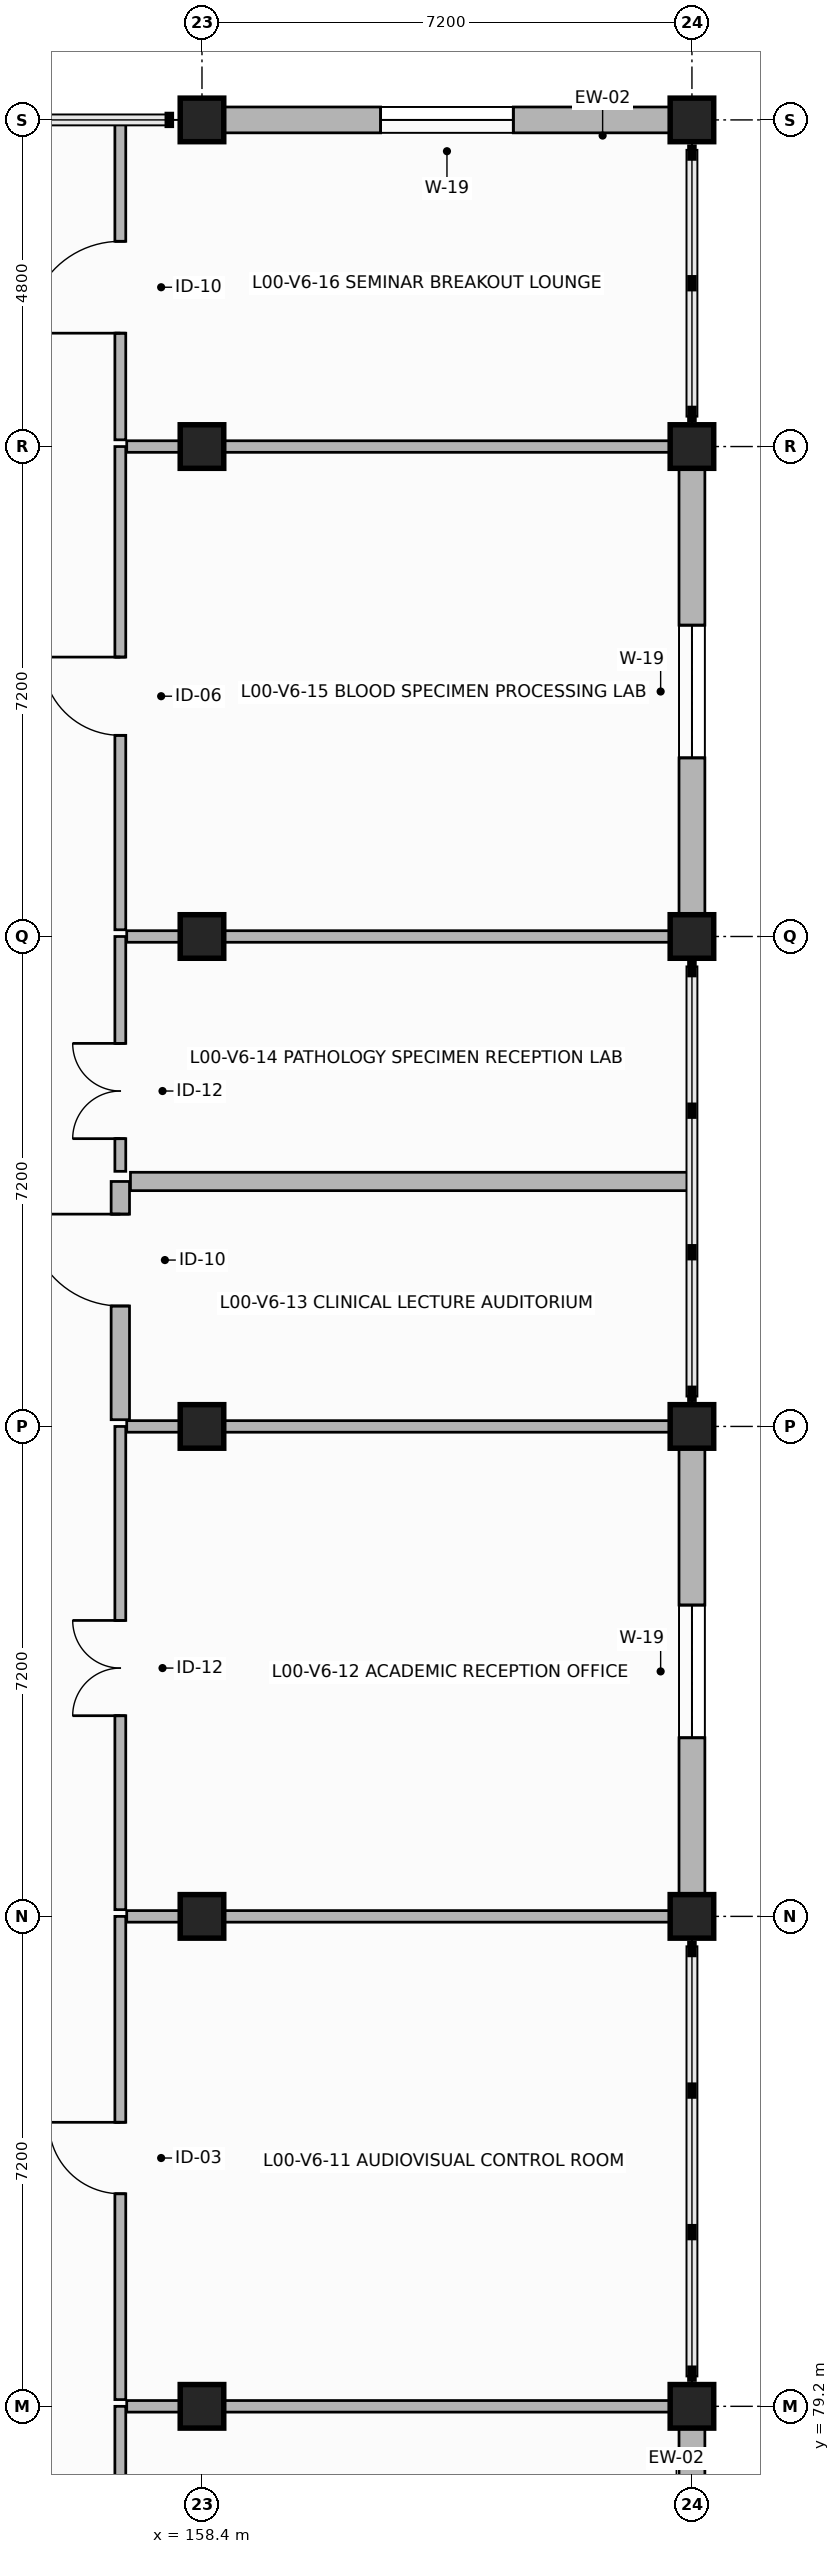
"""IFC4 building model, lengths in metres.
Left out: names, types, materials, properties, quantities, classifications, styles, units other than length and angle.
Written with IfcOpenShell. Run it as: python <this file> out.ifc"""

import sys

from ifc_helpers import new_model, si_unit, direction, frame, frame_2d, origin, origin_2d, place, context, subcontext, project, spatial, rectangle, extrude, element, fill, save


model = new_model("IFC4")
c1 = context("Model", 3, precision=1e-05, world=origin(), true_north=direction((0.0, 1.0)))
c2 = subcontext(c1, "Body", "Model", "MODEL_VIEW")
j1 = project(units=[si_unit("LENGTHUNIT", "METRE"), si_unit("PLANEANGLEUNIT", "RADIAN")], contexts=[c1])
p1 = place(None, origin())
s1 = spatial("IfcSite", under=j1, at=p1, CompositionType="ELEMENT")
p2 = place(p1, origin())
s2 = spatial("IfcBuilding", under=s1, at=p2, CompositionType="ELEMENT")
p3 = place(p2, origin())
s3 = spatial("IfcBuildingStorey", under=s2, at=p3, CompositionType="ELEMENT", Elevation=0.0)
for number, where, z_axis, x_axis in (
    (1, (158.4, 79.2, -0.38), (0.0, 0.0, 1.0), (1.0, 0.0, 0.0)),
    (2, (158.4, 86.4, -0.38), (0.0, 0.0, 1.0), (1.0, 0.0, 0.0)),
    (3, (158.4, 93.6, -0.38), (0.0, 0.0, 1.0), (1.0, 0.0, 0.0)),
    (4, (158.4, 100.8, -0.38), (0.0, 0.0, 1.0), (1.0, 0.0, 0.0)),
    (5, (158.4, 108.0, -0.38), (0.0, 0.0, 1.0), (1.0, 0.0, 0.0)),
    (6, (158.4, 112.8, -0.38), (0.0, 0.0, 1.0), (1.0, 0.0, 0.0)),
    (7, (165.6, 79.2, -0.38), (0.0, 0.0, 1.0), (1.0, 0.0, 0.0)),
    (8, (165.6, 86.4, -0.38), (0.0, 0.0, 1.0), (1.0, 0.0, 0.0)),
    (9, (165.6, 93.6, -0.38), (0.0, 0.0, 1.0), (1.0, 0.0, 0.0)),
    (10, (165.6, 100.8, -0.38), (0.0, 0.0, 1.0), (1.0, 0.0, 0.0)),
    (11, (165.6, 108.0, -0.38), (0.0, 0.0, 1.0), (1.0, 0.0, 0.0)),
    (12, (165.6, 112.8, -0.38), (0.0, 0.0, 1.0), (1.0, 0.0, 0.0)),
):
    element("IfcColumn", number, at=place(p3, frame(where, z_axis=z_axis, x_axis=x_axis)), inside=s3, PredefinedType="COLUMN", context=c2, shape_type="SweptSolid", body=[
        extrude(rectangle(XDim=0.64, YDim=0.64, at=origin_2d()), origin(), (0.0, 0.0, 1.0), 4.56),
    ])
p4 = place(p3, frame((165.6, 72.0, 0.0), z_axis=(0.0, 0.0, 1.0), x_axis=(0.0, 1.0, 0.0)))
e13 = element("IfcWall", 13, at=p4, inside=s3, PredefinedType="SOLIDWALL", context=c2, shape_type="SweptSolid", body=[
    extrude(rectangle(XDim=7.2, YDim=0.38, at=frame_2d((3.6, 0.0))), origin(), (0.0, 0.0, 1.0), 3.51),
])
p5 = place(p4, frame((2.625, 0.0, 0.85)))
e14 = element("IfcOpeningElement", 14, at=p5, cuts=e13, PredefinedType="OPENING", context=c2, shape_type="SweptSolid", body=[
    extrude(rectangle(XDim=1.95, YDim=2.4, at=frame_2d((0.975, 1.2))), frame((0.0, 0.2, 0.0), z_axis=(0.0, -1.0, 0.0), x_axis=(1.0, 0.0, 0.0)), (0.0, 0.0, 1.0), 0.4),
])
p6 = place(p3, frame((165.6, 86.4, 0.0), z_axis=(0.0, 0.0, 1.0), x_axis=(0.0, 1.0, 0.0)))
e15 = element("IfcWall", 15, at=p6, inside=s3, PredefinedType="SOLIDWALL", context=c2, shape_type="SweptSolid", body=[
    extrude(rectangle(XDim=7.2, YDim=0.38, at=frame_2d((3.6, 0.0))), origin(), (0.0, 0.0, 1.0), 3.51),
])
p7 = place(p6, frame((2.625, 0.0, 0.85)))
e16 = element("IfcOpeningElement", 16, at=p7, cuts=e15, PredefinedType="OPENING", context=c2, shape_type="SweptSolid", body=[
    extrude(rectangle(XDim=1.95, YDim=2.4, at=frame_2d((0.975, 1.2))), frame((0.0, 0.2, 0.0), z_axis=(0.0, -1.0, 0.0), x_axis=(1.0, 0.0, 0.0)), (0.0, 0.0, 1.0), 0.4),
])
p8 = place(p3, frame((165.6, 100.8, 0.0), z_axis=(0.0, 0.0, 1.0), x_axis=(0.0, 1.0, 0.0)))
e17 = element("IfcWall", 17, at=p8, inside=s3, PredefinedType="SOLIDWALL", context=c2, shape_type="SweptSolid", body=[
    extrude(rectangle(XDim=7.2, YDim=0.38, at=frame_2d((3.6, 0.0))), origin(), (0.0, 0.0, 1.0), 3.51),
])
p9 = place(p8, frame((2.625, 0.0, 0.85)))
e18 = element("IfcOpeningElement", 18, at=p9, cuts=e17, PredefinedType="OPENING", context=c2, shape_type="SweptSolid", body=[
    extrude(rectangle(XDim=1.95, YDim=2.4, at=frame_2d((0.975, 1.2))), frame((0.0, 0.2, 0.0), z_axis=(0.0, -1.0, 0.0), x_axis=(1.0, 0.0, 0.0)), (0.0, 0.0, 1.0), 0.4),
])
p10 = place(p3, frame((165.6, 112.8, 0.0), z_axis=(0.0, 0.0, 1.0), x_axis=(-1.0, 0.0, 0.0)))
e19 = element("IfcWall", 19, at=p10, inside=s3, PredefinedType="SOLIDWALL", context=c2, shape_type="SweptSolid", body=[
    extrude(rectangle(XDim=7.2, YDim=0.38, at=frame_2d((3.6, 0.0))), origin(), (0.0, 0.0, 1.0), 3.51),
])
p11 = place(p10, frame((2.625, 0.0, 0.85)))
e20 = element("IfcOpeningElement", 20, at=p11, cuts=e19, PredefinedType="OPENING", context=c2, shape_type="SweptSolid", body=[
    extrude(rectangle(XDim=1.95, YDim=2.4, at=frame_2d((0.975, 1.2))), frame((0.0, 0.2, 0.0), z_axis=(0.0, -1.0, 0.0), x_axis=(1.0, 0.0, 0.0)), (0.0, 0.0, 1.0), 0.4),
])
p12 = place(p3, frame((157.2, 72.099, 0.0), z_axis=(0.0, 0.0, 1.0), x_axis=(0.0, 1.0, 0.0)))
e21 = element("IfcWall", 21, at=p12, inside=s3, PredefinedType="PARTITIONING", context=c2, shape_type="SweptSolid", body=[
    extrude(rectangle(XDim=7.101, YDim=0.16, at=frame_2d((3.55, 0.0))), origin(), (0.0, 0.0, 1.0), 3.49),
])
p13 = place(p12, frame((2.857, 0.0, 0.0)))
e22 = element("IfcOpeningElement", 22, at=p13, cuts=e21, PredefinedType="OPENING", context=c2, shape_type="SweptSolid", body=[
    extrude(rectangle(XDim=1.15, YDim=2.25, at=frame_2d((0.575, 1.125))), frame((0.0, 0.09, 0.0), z_axis=(0.0, -1.0, 0.0), x_axis=(1.0, 0.0, 0.0)), (0.0, 0.0, 1.0), 0.18),
])
p14 = place(p3, frame((157.294, 79.2, 0.0), z_axis=(0.0, 0.0, 1.0), x_axis=(1.0, 0.0, 0.0)))
e23 = element("IfcWall", 23, at=p14, inside=s3, PredefinedType="PARTITIONING", context=c2, shape_type="SweptSolid", body=[
    extrude(rectangle(XDim=8.101, YDim=0.17, at=frame_2d((4.051, 0.0))), origin(), (0.0, 0.0, 1.0), 3.49),
])
p15 = place(p3, frame((157.2, 79.299, 0.0), z_axis=(0.0, 0.0, 1.0), x_axis=(0.0, 1.0, 0.0)))
e24 = element("IfcWall", 24, at=p15, inside=s3, PredefinedType="PARTITIONING", context=c2, shape_type="SweptSolid", body=[
    extrude(rectangle(XDim=7.101, YDim=0.16, at=frame_2d((3.55, 0.0))), origin(), (0.0, 0.0, 1.0), 3.49),
])
p16 = place(p15, frame((3.025, 0.0, 0.0)))
e25 = element("IfcOpeningElement", 25, at=p16, cuts=e24, PredefinedType="OPENING", context=c2, shape_type="SweptSolid", body=[
    extrude(rectangle(XDim=1.05, YDim=2.15, at=frame_2d((0.525, 1.075))), frame((0.0, 0.09, 0.0), z_axis=(0.0, -1.0, 0.0), x_axis=(1.0, 0.0, 0.0)), (0.0, 0.0, 1.0), 0.18),
])
p17 = place(p3, frame((157.294, 86.4, 0.0), z_axis=(0.0, 0.0, 1.0), x_axis=(1.0, 0.0, 0.0)))
e26 = element("IfcWall", 26, at=p17, inside=s3, PredefinedType="PARTITIONING", context=c2, shape_type="SweptSolid", body=[
    extrude(rectangle(XDim=8.101, YDim=0.17, at=frame_2d((4.051, 0.0))), origin(), (0.0, 0.0, 1.0), 3.49),
])
p18 = place(p3, frame((157.2, 86.499, 0.0), z_axis=(0.0, 0.0, 1.0), x_axis=(0.0, 1.0, 0.0)))
e27 = element("IfcWall", 27, at=p18, inside=s3, PredefinedType="PARTITIONING", context=c2, shape_type="SweptSolid", body=[
    extrude(rectangle(XDim=7.101, YDim=0.16, at=frame_2d((3.551, 0.0))), origin(), (0.0, 0.0, 1.0), 3.49),
])
p19 = place(p18, frame((2.85, 0.0, 0.0)))
e28 = element("IfcOpeningElement", 28, at=p19, cuts=e27, PredefinedType="OPENING", context=c2, shape_type="SweptSolid", body=[
    extrude(rectangle(XDim=1.4, YDim=2.3, at=frame_2d((0.7, 1.15))), frame((0.0, 0.09, 0.0), z_axis=(0.0, -1.0, 0.0), x_axis=(1.0, 0.0, 0.0)), (0.0, 0.0, 1.0), 0.18),
])
p20 = place(p3, frame((157.294, 93.6, 0.0), z_axis=(0.0, 0.0, 1.0), x_axis=(1.0, 0.0, 0.0)))
e29 = element("IfcWall", 29, at=p20, inside=s3, PredefinedType="PARTITIONING", context=c2, shape_type="SweptSolid", body=[
    extrude(rectangle(XDim=8.101, YDim=0.17, at=frame_2d((4.051, 0.0))), origin(), (0.0, 0.0, 1.0), 3.49),
])
p21 = place(p3, frame((157.2, 93.699, 0.0), z_axis=(0.0, 0.0, 1.0), x_axis=(0.0, 1.0, 0.0)))
e30 = element("IfcWall", 30, at=p21, inside=s3, PredefinedType="PARTITIONING", context=c2, shape_type="SweptSolid", body=[
    extrude(rectangle(XDim=3.501, YDim=0.27, at=frame_2d((1.75, 0.0))), origin(), (0.0, 0.0, 1.0), 3.49),
])
p22 = place(p21, frame((1.671, 0.0, 0.0)))
e31 = element("IfcOpeningElement", 31, at=p22, cuts=e30, PredefinedType="OPENING", context=c2, shape_type="SweptSolid", body=[
    extrude(rectangle(XDim=1.35, YDim=2.25, at=frame_2d((0.675, 1.125))), frame((0.0, 0.145, 0.0), z_axis=(0.0, -1.0, 0.0), x_axis=(1.0, 0.0, 0.0)), (0.0, 0.0, 1.0), 0.29),
])
p23 = place(p3, frame((157.349, 97.2, 0.0), z_axis=(0.0, 0.0, 1.0), x_axis=(1.0, 0.0, 0.0)))
e32 = element("IfcWall", 32, at=p23, inside=s3, PredefinedType="PARTITIONING", context=c2, shape_type="SweptSolid", body=[
    extrude(rectangle(XDim=8.251, YDim=0.27, at=frame_2d((4.125, 0.0))), origin(), (0.0, 0.0, 1.0), 3.49),
])
p24 = place(p3, frame((157.2, 97.349, 0.0), z_axis=(0.0, 0.0, 1.0), x_axis=(0.0, 1.0, 0.0)))
e33 = element("IfcWall", 33, at=p24, inside=s3, PredefinedType="PARTITIONING", context=c2, shape_type="SweptSolid", body=[
    extrude(rectangle(XDim=3.451, YDim=0.16, at=frame_2d((1.726, 0.0))), origin(), (0.0, 0.0, 1.0), 3.49),
])
p25 = place(p24, frame((0.48, 0.0, 0.0)))
e34 = element("IfcOpeningElement", 34, at=p25, cuts=e33, PredefinedType="OPENING", context=c2, shape_type="SweptSolid", body=[
    extrude(rectangle(XDim=1.4, YDim=2.3, at=frame_2d((0.7, 1.15))), frame((0.0, 0.09, 0.0), z_axis=(0.0, -1.0, 0.0), x_axis=(1.0, 0.0, 0.0)), (0.0, 0.0, 1.0), 0.18),
])
p26 = place(p3, frame((157.294, 100.8, 0.0), z_axis=(0.0, 0.0, 1.0), x_axis=(1.0, 0.0, 0.0)))
e35 = element("IfcWall", 35, at=p26, inside=s3, PredefinedType="PARTITIONING", context=c2, shape_type="SweptSolid", body=[
    extrude(rectangle(XDim=8.101, YDim=0.17, at=frame_2d((4.051, 0.0))), origin(), (0.0, 0.0, 1.0), 3.49),
])
p27 = place(p3, frame((157.2, 100.899, 0.0), z_axis=(0.0, 0.0, 1.0), x_axis=(0.0, 1.0, 0.0)))
e36 = element("IfcWall", 36, at=p27, inside=s3, PredefinedType="PARTITIONING", context=c2, shape_type="SweptSolid", body=[
    extrude(rectangle(XDim=7.101, YDim=0.16, at=frame_2d((3.551, 0.0))), origin(), (0.0, 0.0, 1.0), 3.49),
])
p28 = place(p27, frame((2.857, 0.0, 0.0)))
e37 = element("IfcOpeningElement", 37, at=p28, cuts=e36, PredefinedType="OPENING", context=c2, shape_type="SweptSolid", body=[
    extrude(rectangle(XDim=1.15, YDim=2.25, at=frame_2d((0.575, 1.125))), frame((0.0, 0.09, 0.0), z_axis=(0.0, -1.0, 0.0), x_axis=(1.0, 0.0, 0.0)), (0.0, 0.0, 1.0), 0.18),
])
p29 = place(p3, frame((157.294, 108.0, 0.0), z_axis=(0.0, 0.0, 1.0), x_axis=(1.0, 0.0, 0.0)))
e38 = element("IfcWall", 38, at=p29, inside=s3, PredefinedType="PARTITIONING", context=c2, shape_type="SweptSolid", body=[
    extrude(rectangle(XDim=8.101, YDim=0.17, at=frame_2d((4.051, 0.0))), origin(), (0.0, 0.0, 1.0), 3.49),
])
p30 = place(p3, frame((157.2, 108.099, 0.0), z_axis=(0.0, 0.0, 1.0), x_axis=(0.0, 1.0, 0.0)))
e39 = element("IfcWall", 39, at=p30, inside=s3, PredefinedType="PARTITIONING", context=c2, shape_type="SweptSolid", body=[
    extrude(rectangle(XDim=4.701, YDim=0.16, at=frame_2d((2.351, 0.0))), origin(), (0.0, 0.0, 1.0), 3.49),
])
p31 = place(p30, frame((1.567, 0.0, 0.0)))
e40 = element("IfcOpeningElement", 40, at=p31, cuts=e39, PredefinedType="OPENING", context=c2, shape_type="SweptSolid", body=[
    extrude(rectangle(XDim=1.35, YDim=2.25, at=frame_2d((0.675, 1.125))), frame((0.0, 0.09, 0.0), z_axis=(0.0, -1.0, 0.0), x_axis=(1.0, 0.0, 0.0)), (0.0, 0.0, 1.0), 0.18),
])
p32 = place(p7, origin())
e41 = element("IfcWindow", 41, at=p32, inside=s3, PartitioningType="SINGLE_PANEL", PredefinedType="WINDOW", context=c2, shape_type="SweptSolid", body=[
    extrude(rectangle(XDim=1.95, YDim=2.4, at=frame_2d((0.975, 1.2))), frame((0.0, 0.03, 0.0), z_axis=(0.0, -1.0, 0.0), x_axis=(1.0, 0.0, 0.0)), (0.0, 0.0, 1.0), 0.06),
])
fill(e16, e41)
p33 = place(p9, origin())
e42 = element("IfcWindow", 42, at=p33, inside=s3, PartitioningType="SINGLE_PANEL", PredefinedType="WINDOW", context=c2, shape_type="SweptSolid", body=[
    extrude(rectangle(XDim=1.95, YDim=2.4, at=frame_2d((0.975, 1.2))), frame((0.0, 0.03, 0.0), z_axis=(0.0, -1.0, 0.0), x_axis=(1.0, 0.0, 0.0)), (0.0, 0.0, 1.0), 0.06),
])
fill(e18, e42)
p34 = place(p11, origin())
e43 = element("IfcWindow", 43, at=p34, inside=s3, PartitioningType="SINGLE_PANEL", PredefinedType="WINDOW", context=c2, shape_type="SweptSolid", body=[
    extrude(rectangle(XDim=1.95, YDim=2.4, at=frame_2d((0.975, 1.2))), frame((0.0, 0.03, 0.0), z_axis=(0.0, -1.0, 0.0), x_axis=(1.0, 0.0, 0.0)), (0.0, 0.0, 1.0), 0.06),
])
fill(e20, e43)
p35 = place(p16, origin())
e44 = element("IfcDoor", 44, at=p35, inside=s3, OperationType="SINGLE_SWING_RIGHT", PredefinedType="DOOR", context=c2, shape_type="SweptSolid", body=[
    extrude(rectangle(XDim=1.05, YDim=2.15, at=frame_2d((0.525, 1.075))), frame((0.0, 0.025, 0.0), z_axis=(0.0, -1.0, 0.0), x_axis=(1.0, 0.0, 0.0)), (0.0, 0.0, 1.0), 0.05),
])
fill(e25, e44)
p36 = place(p19, origin())
e45 = element("IfcDoor", 45, at=p36, inside=s3, OperationType="DOUBLE_DOOR_SINGLE_SWING", PredefinedType="DOOR", context=c2, shape_type="SweptSolid", body=[
    extrude(rectangle(XDim=1.4, YDim=2.3, at=frame_2d((0.7, 1.15))), frame((0.0, 0.025, 0.0), z_axis=(0.0, -1.0, 0.0), x_axis=(1.0, 0.0, 0.0)), (0.0, 0.0, 1.0), 0.05),
])
fill(e28, e45)
p37 = place(p22, origin())
e46 = element("IfcDoor", 46, at=p37, inside=s3, OperationType="SINGLE_SWING_RIGHT", PredefinedType="DOOR", context=c2, shape_type="SweptSolid", body=[
    extrude(rectangle(XDim=1.35, YDim=2.25, at=frame_2d((0.675, 1.125))), frame((0.0, 0.025, 0.0), z_axis=(0.0, -1.0, 0.0), x_axis=(1.0, 0.0, 0.0)), (0.0, 0.0, 1.0), 0.05),
])
fill(e31, e46)
p38 = place(p25, origin())
e47 = element("IfcDoor", 47, at=p38, inside=s3, OperationType="DOUBLE_DOOR_SINGLE_SWING", PredefinedType="DOOR", context=c2, shape_type="SweptSolid", body=[
    extrude(rectangle(XDim=1.4, YDim=2.3, at=frame_2d((0.7, 1.15))), frame((0.0, 0.025, 0.0), z_axis=(0.0, -1.0, 0.0), x_axis=(1.0, 0.0, 0.0)), (0.0, 0.0, 1.0), 0.05),
])
fill(e34, e47)
p39 = place(p28, origin())
e48 = element("IfcDoor", 48, at=p39, inside=s3, OperationType="SINGLE_SWING_RIGHT", PredefinedType="DOOR", context=c2, shape_type="SweptSolid", body=[
    extrude(rectangle(XDim=1.15, YDim=2.25, at=frame_2d((0.575, 1.125))), frame((0.0, 0.025, 0.0), z_axis=(0.0, -1.0, 0.0), x_axis=(1.0, 0.0, 0.0)), (0.0, 0.0, 1.0), 0.05),
])
fill(e37, e48)
p40 = place(p31, origin())
e49 = element("IfcDoor", 49, at=p40, inside=s3, OperationType="SINGLE_SWING_LEFT", PredefinedType="DOOR", context=c2, shape_type="SweptSolid", body=[
    extrude(rectangle(XDim=1.35, YDim=2.25, at=frame_2d((0.675, 1.125))), frame((0.0, 0.025, 0.0), z_axis=(0.0, -1.0, 0.0), x_axis=(1.0, 0.0, 0.0)), (0.0, 0.0, 1.0), 0.05),
])
fill(e40, e49)
save(model, sys.argv[1])
